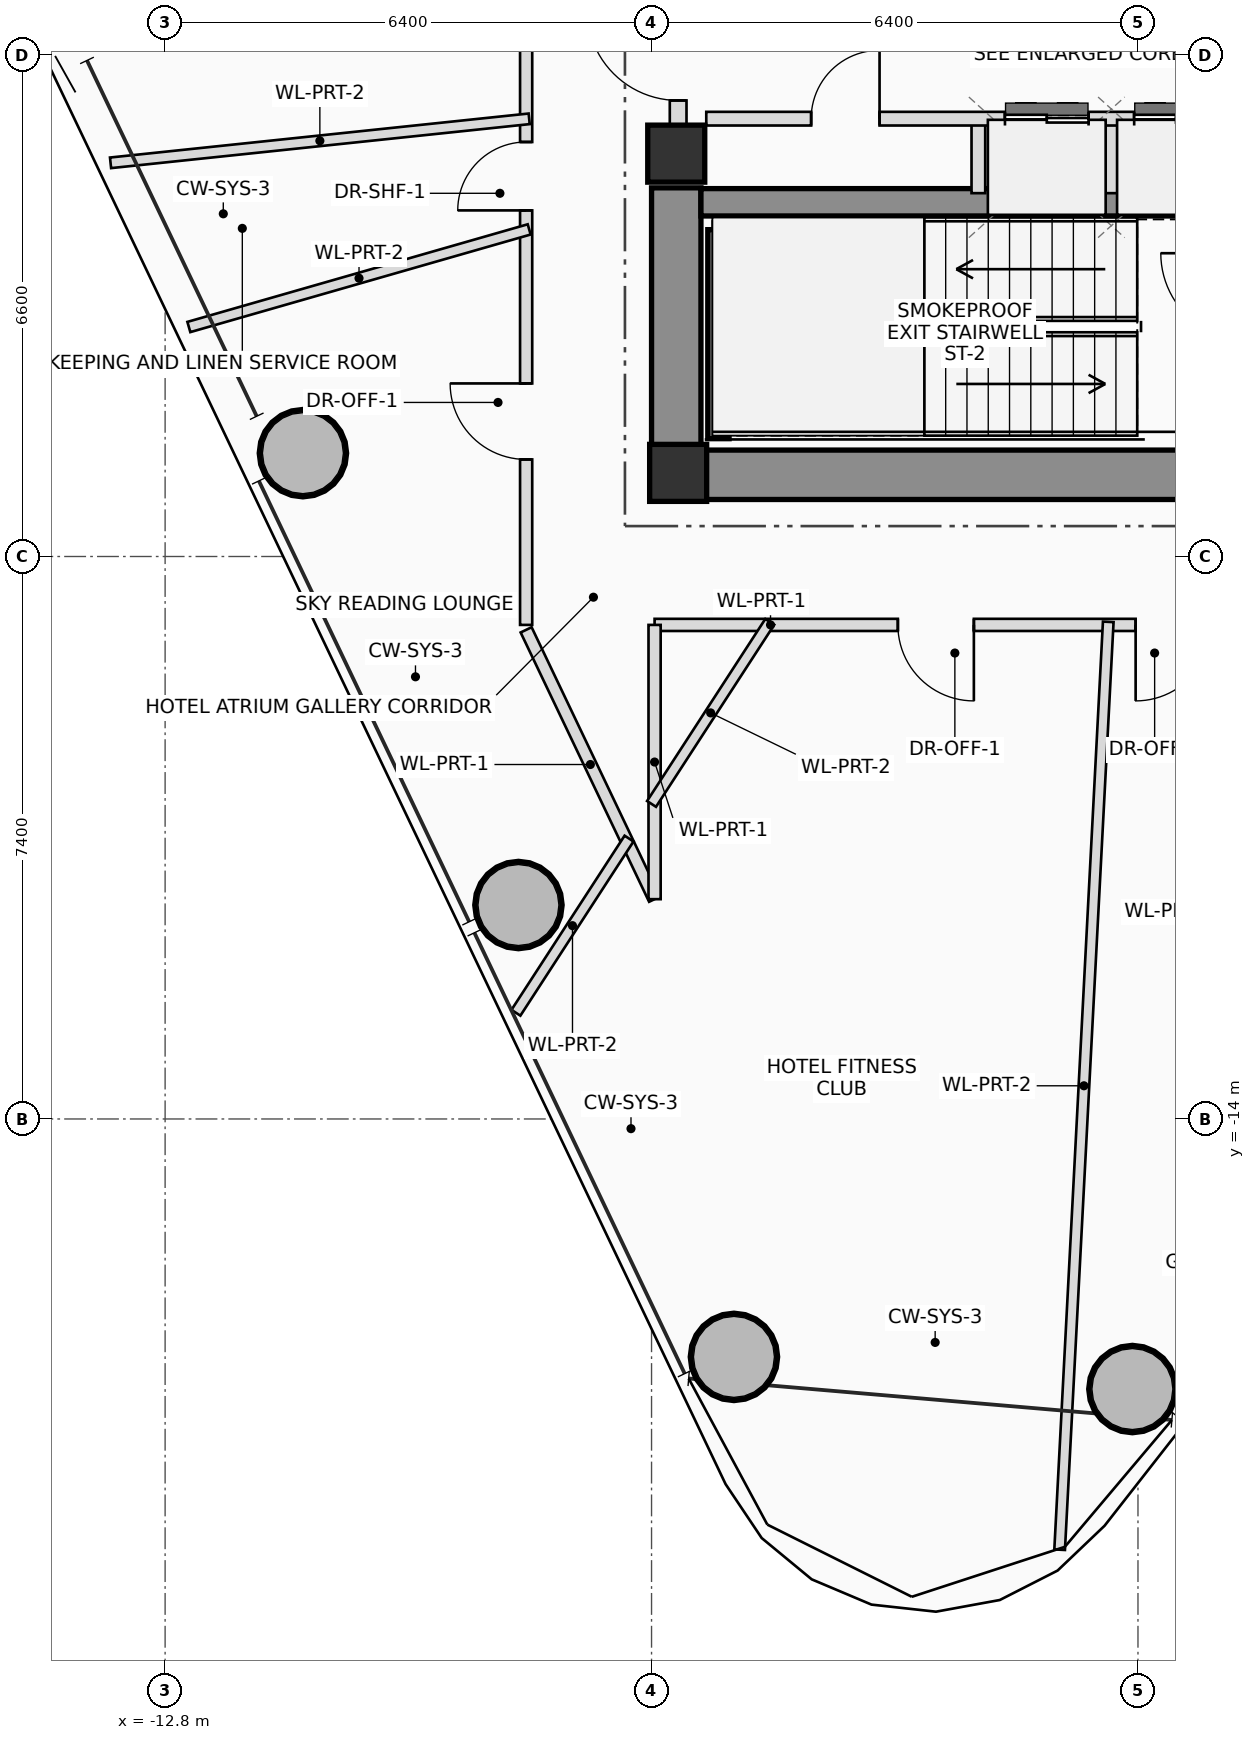
"""IFC4 building model, lengths in metres.
Left out: names, types, materials, properties, quantities, classifications, styles, units other than length and angle.
Written with IfcOpenShell. Run it as: python <this file> out.ifc"""

import sys

from ifc_helpers import new_model, si_unit, direction, frame, frame_2d, origin, origin_2d, place, context, subcontext, project, spatial, rectangle, hollow_circle, extrude, source, transform, mapped, element, fill, save


model = new_model("IFC4")
c1 = context("Model", 3, precision=1e-05, world=origin(), true_north=direction((0.0, 1.0)))
c2 = subcontext(c1, "Body", "Model", "MODEL_VIEW")
j1 = project(units=[si_unit("LENGTHUNIT", "METRE"), si_unit("PLANEANGLEUNIT", "RADIAN")], contexts=[c1])
p1 = place(None, origin())
s1 = spatial("IfcSite", under=j1, at=p1, CompositionType="ELEMENT")
p2 = place(p1, origin())
s2 = spatial("IfcBuilding", under=s1, at=p2, CompositionType="ELEMENT")
p3 = place(p2, frame((0.0, 0.0, 194.9)))
s3 = spatial("IfcBuildingStorey", under=s2, at=p3, CompositionType="ELEMENT", Elevation=194.9)
m1 = source(origin(), c2, "Body", "SweptSolid", [
    extrude(rectangle(XDim=0.75, YDim=0.75, at=origin_2d()), origin(), (0.0, 0.0, 1.0), 3.45),
])
p4 = place(p3, frame((-6.05, -5.5, 0.0), z_axis=(0.0, 0.0, 1.0), x_axis=(1.0, 0.0, 0.0)))
e1 = element("IfcColumn", 1, at=p4, inside=s3, PredefinedType="COLUMN", context=c2, shape_type="MappedRepresentation", body=[
    mapped(m1, transform((0.0, 0.0, 0.0), scale=1.0)),
])
p5 = place(p3, frame((-6.4, -5.525, 0.0), z_axis=(0.0, 0.0, 1.0), x_axis=(1.0, 0.0, 0.0)))
e2 = element("IfcWall", 2, at=p5, inside=s3, PredefinedType="SHEAR", context=c2, shape_type="SweptSolid", body=[
    extrude(rectangle(XDim=12.8, YDim=0.65, at=frame_2d((6.4, 0.0))), origin(), (0.0, 0.0, 1.0), 3.45),
])
p6 = place(p5, frame((8.6, 0.0, 0.0)))
e3 = element("IfcOpeningElement", 3, at=p6, cuts=e2, PredefinedType="OPENING", context=c2, shape_type="SweptSolid", body=[
    extrude(rectangle(XDim=1.2, YDim=2.2, at=frame_2d((0.6, 1.1))), frame((0.0, 0.335, 0.0), z_axis=(0.0, -1.0, 0.0), x_axis=(1.0, 0.0, 0.0)), (0.0, 0.0, 1.0), 0.67),
])
p7 = place(p3, frame((-6.075, -5.2, 0.0), z_axis=(0.0, 0.0, 1.0), x_axis=(0.0, 1.0, 0.0)))
e4 = element("IfcWall", 4, at=p7, inside=s3, PredefinedType="SHEAR", context=c2, shape_type="SweptSolid", body=[
    extrude(rectangle(XDim=3.45, YDim=0.65, at=frame_2d((1.725, 0.0))), origin(), (0.0, 0.0, 1.0), 3.45),
])
p8 = place(p3, frame((-5.75, -1.94, 0.0), z_axis=(0.0, 0.0, 1.0), x_axis=(1.0, 0.0, 0.0)))
e5 = element("IfcWall", 5, at=p8, inside=s3, PredefinedType="SHEAR", context=c2, shape_type="SweptSolid", body=[
    extrude(rectangle(XDim=11.5, YDim=0.36, at=frame_2d((5.75, 0.0))), origin(), (0.0, 0.0, 1.0), 3.45),
])
p9 = place(p3, frame((-5.52, -5.05, 0.0), z_axis=(0.0, 0.0, 1.0), x_axis=(0.0, 1.0, 0.0)))
e6 = element("IfcWall", 6, at=p9, inside=s3, PredefinedType="SHEAR", context=c2, shape_type="SweptSolid", body=[
    extrude(rectangle(XDim=2.75, YDim=0.28, at=frame_2d((1.375, 0.0))), origin(), (0.0, 0.0, 1.0), 3.45),
])
p10 = place(p3, frame((-6.075, -1.3, 0.0), z_axis=(0.0, 0.0, 1.0), x_axis=(1.0, 0.0, 0.0)))
e7 = element("IfcColumn", 7, at=p10, inside=s3, PredefinedType="COLUMN", context=c2, shape_type="MappedRepresentation", body=[
    mapped(m1, transform((0.0, 0.0, 0.0), scale=1.0)),
])
m2 = source(origin(), c2, "Body", "SweptSolid", [
    extrude(hollow_circle(Radius=0.575, WallThickness=0.042, at=origin_2d()), origin(), (0.0, 0.0, 1.0), 3.45),
])
for number, where, z_axis, x_axis in (
    (8, (-0.073, -17.553, 0.0), (0.0, 0.0, 1.0), (1.0, 0.0, 0.0)),
    (9, (-10.987, -5.24, 0.0), (0.0, 0.0, 1.0), (1.0, 0.0, 0.0)),
    (10, (-8.151, -11.185, 0.0), (0.0, 0.0, 1.0), (1.0, 0.0, 0.0)),
    (11, (-5.316, -17.13, 0.0), (0.0, 0.0, 1.0), (1.0, 0.0, 0.0)),
):
    element("IfcColumn", number, at=place(p3, frame(where, z_axis=z_axis, x_axis=x_axis)), inside=s3, PredefinedType="COLUMN", context=c2, shape_type="MappedRepresentation", body=[
        mapped(m2, transform((0.0, 0.0, 0.0), scale=1.0)),
    ])
p11 = place(p3, frame((-6.05, -0.95, 0.0), z_axis=(0.0, 0.0, 1.0), x_axis=(0.0, 1.0, 0.0)))
e12 = element("IfcWall", 12, at=p11, inside=s3, PredefinedType="PLUMBINGWALL", context=c2, shape_type="SweptSolid", body=[
    extrude(rectangle(XDim=1.9, YDim=0.22, at=frame_2d((0.95, 0.0))), origin(), (0.0, 0.0, 1.0), 2.23),
])
p12 = place(p11, frame((0.35, 0.0, 0.0)))
e13 = element("IfcOpeningElement", 13, at=p12, cuts=e12, PredefinedType="OPENING", context=c2, shape_type="SweptSolid", body=[
    extrude(rectangle(XDim=1.2, YDim=2.2, at=frame_2d((0.6, 1.1))), frame((0.0, 0.12, 0.0), z_axis=(0.0, -1.0, 0.0), x_axis=(1.0, 0.0, 0.0)), (0.0, 0.0, 1.0), 0.24),
])
for number, where, z_axis, x_axis in (
    (14, (-2.1, -1.82, 0.0), (0.0, 0.0, 1.0), (0.0, 1.0, 0.0)),
    (15, (-0.35, -1.82, 0.0), (0.0, 0.0, 1.0), (0.0, 1.0, 0.0)),
):
    element("IfcWall", number, at=place(p3, frame(where, z_axis=z_axis, x_axis=x_axis)), inside=s3, PredefinedType="PLUMBINGWALL", context=c2, shape_type="SweptSolid", body=[
        extrude(rectangle(XDim=0.98, YDim=0.18, at=frame_2d((0.49, 0.0))), origin(), (0.0, 0.0, 1.0), 3.25),
    ])
p13 = place(p3, frame((-5.68, -0.84, 0.0), z_axis=(0.0, 0.0, 1.0), x_axis=(1.0, 0.0, 0.0)))
e16 = element("IfcWall", 16, at=p13, inside=s3, PredefinedType="PLUMBINGWALL", context=c2, shape_type="SweptSolid", body=[
    extrude(rectangle(XDim=10.22, YDim=0.18, at=frame_2d((5.11, 0.0))), origin(), (0.0, 0.0, 1.0), 3.25),
])
p14 = place(p13, frame((1.38, 0.0, 0.0)))
e17 = element("IfcOpeningElement", 17, at=p14, cuts=e16, PredefinedType="OPENING", context=c2, shape_type="SweptSolid", body=[
    extrude(rectangle(XDim=0.9, YDim=2.05, at=frame_2d((0.45, 1.025))), frame((0.0, 0.1, 0.0), z_axis=(0.0, -1.0, 0.0), x_axis=(1.0, 0.0, 0.0)), (0.0, 0.0, 1.0), 0.2),
])
p15 = place(p13, frame((3.93, 0.0, 0.0)))
e18 = element("IfcOpeningElement", 18, at=p15, cuts=e16, PredefinedType="OPENING", context=c2, shape_type="SweptSolid", body=[
    extrude(rectangle(XDim=1.1, YDim=2.2, at=frame_2d((0.55, 1.1))), frame((0.0, 0.1, 0.0), z_axis=(0.0, -1.0, 0.0), x_axis=(1.0, 0.0, 0.0)), (0.0, 0.0, 1.0), 0.2),
])
p16 = place(p13, frame((5.63, 0.0, 0.0)))
e19 = element("IfcOpeningElement", 19, at=p16, cuts=e16, PredefinedType="OPENING", context=c2, shape_type="SweptSolid", body=[
    extrude(rectangle(XDim=1.1, YDim=2.2, at=frame_2d((0.55, 1.1))), frame((0.0, 0.1, 0.0), z_axis=(0.0, -1.0, 0.0), x_axis=(1.0, 0.0, 0.0)), (0.0, 0.0, 1.0), 0.2),
])
p17 = place(p13, frame((9.02, 0.0, 0.0)))
e20 = element("IfcOpeningElement", 20, at=p17, cuts=e16, PredefinedType="OPENING", context=c2, shape_type="SweptSolid", body=[
    extrude(rectangle(XDim=0.9, YDim=2.05, at=frame_2d((0.45, 1.025))), frame((0.0, 0.1, 0.0), z_axis=(0.0, -1.0, 0.0), x_axis=(1.0, 0.0, 0.0)), (0.0, 0.0, 1.0), 0.2),
])
p18 = place(p3, frame((-6.36, -11.108, 0.0), z_axis=(0.0, 0.0, 1.0), x_axis=(-0.430493571255, 0.902593643401, 0.0)))
e21 = element("IfcWall", 21, at=p18, inside=s3, PredefinedType="PARTITIONING", context=c2, shape_type="SweptSolid", body=[
    extrude(rectangle(XDim=3.926, YDim=0.16, at=frame_2d((1.963, 0.0))), origin(), (0.0, 0.0, 1.0), 2.605),
])
p19 = place(p3, frame((-8.05, -7.5, 0.0), z_axis=(0.0, 0.0, 1.0), x_axis=(0.0, 1.0, 0.0)))
e22 = element("IfcWall", 22, at=p19, inside=s3, PredefinedType="PARTITIONING", context=c2, shape_type="SweptSolid", body=[
    extrude(rectangle(XDim=15.0, YDim=0.16, at=frame_2d((7.5, 0.0))), origin(), (0.0, 0.0, 1.0), 2.605),
])
p20 = place(p19, frame((2.177, 0.0, 0.0)))
e23 = element("IfcOpeningElement", 23, at=p20, cuts=e22, PredefinedType="OPENING", context=c2, shape_type="SweptSolid", body=[
    extrude(rectangle(XDim=1.0, YDim=2.25, at=frame_2d((0.5, 1.125))), frame((0.0, 0.09, 0.0), z_axis=(0.0, -1.0, 0.0), x_axis=(1.0, 0.0, 0.0)), (0.0, 0.0, 1.0), 0.18),
])
p21 = place(p19, frame((5.453, 0.0, 0.0)))
e24 = element("IfcOpeningElement", 24, at=p21, cuts=e22, PredefinedType="OPENING", context=c2, shape_type="SweptSolid", body=[
    extrude(rectangle(XDim=0.9, YDim=2.05, at=frame_2d((0.45, 1.025))), frame((0.0, 0.09, 0.0), z_axis=(0.0, -1.0, 0.0), x_axis=(1.0, 0.0, 0.0)), (0.0, 0.0, 1.0), 0.18),
])
p22 = place(p19, frame((8.707, 0.0, 0.0)))
e25 = element("IfcOpeningElement", 25, at=p22, cuts=e22, PredefinedType="OPENING", context=c2, shape_type="SweptSolid", body=[
    extrude(rectangle(XDim=1.05, YDim=2.2, at=frame_2d((0.525, 1.1))), frame((0.0, 0.09, 0.0), z_axis=(0.0, -1.0, 0.0), x_axis=(1.0, 0.0, 0.0)), (0.0, 0.0, 1.0), 0.18),
])
p23 = place(p19, frame((12.397, 0.0, 0.0)))
e26 = element("IfcOpeningElement", 26, at=p23, cuts=e22, PredefinedType="OPENING", context=c2, shape_type="SweptSolid", body=[
    extrude(rectangle(XDim=1.0, YDim=2.25, at=frame_2d((0.5, 1.125))), frame((0.0, 0.09, 0.0), z_axis=(0.0, -1.0, 0.0), x_axis=(1.0, 0.0, 0.0)), (0.0, 0.0, 1.0), 0.18),
])
p24 = place(p3, frame((5.25, -7.5, 0.0), z_axis=(0.0, 0.0, 1.0), x_axis=(-1.0, 0.0, 0.0)))
e27 = element("IfcWall", 27, at=p24, inside=s3, PredefinedType="PARTITIONING", context=c2, shape_type="SweptSolid", body=[
    extrude(rectangle(XDim=11.61, YDim=0.16, at=frame_2d((5.805, 0.0))), origin(), (0.0, 0.0, 1.0), 2.605),
])
p25 = place(p24, frame((1.525, 0.0, 0.0)))
e28 = element("IfcOpeningElement", 28, at=p25, cuts=e27, PredefinedType="OPENING", context=c2, shape_type="SweptSolid", body=[
    extrude(rectangle(XDim=1.05, YDim=2.2, at=frame_2d((0.525, 1.1))), frame((0.0, 0.09, 0.0), z_axis=(0.0, -1.0, 0.0), x_axis=(1.0, 0.0, 0.0)), (0.0, 0.0, 1.0), 0.18),
])
p26 = place(p24, frame((4.281, 0.0, 0.0)))
e29 = element("IfcOpeningElement", 29, at=p26, cuts=e27, PredefinedType="OPENING", context=c2, shape_type="SweptSolid", body=[
    extrude(rectangle(XDim=1.0, YDim=2.25, at=frame_2d((0.5, 1.125))), frame((0.0, 0.09, 0.0), z_axis=(0.0, -1.0, 0.0), x_axis=(1.0, 0.0, 0.0)), (0.0, 0.0, 1.0), 0.18),
])
p27 = place(p24, frame((7.409, 0.0, 0.0)))
e30 = element("IfcOpeningElement", 30, at=p27, cuts=e27, PredefinedType="OPENING", context=c2, shape_type="SweptSolid", body=[
    extrude(rectangle(XDim=1.0, YDim=2.25, at=frame_2d((0.5, 1.125))), frame((0.0, 0.09, 0.0), z_axis=(0.0, -1.0, 0.0), x_axis=(1.0, 0.0, 0.0)), (0.0, 0.0, 1.0), 0.18),
])
p28 = place(p3, frame((-6.36, -7.5, 0.0), z_axis=(0.0, 0.0, 1.0), x_axis=(0.0, -1.0, 0.0)))
e31 = element("IfcWall", 31, at=p28, inside=s3, PredefinedType="PARTITIONING", context=c2, shape_type="SweptSolid", body=[
    extrude(rectangle(XDim=3.608, YDim=0.16, at=frame_2d((1.804, 0.0))), origin(), (0.0, 0.0, 1.0), 3.25),
])
p29 = place(p3, frame((-8.01, -0.842, 0.0), z_axis=(0.0, 0.0, 1.0), x_axis=(-0.994518006468, -0.104565457063, 0.0)))
e32 = element("IfcWall", 32, at=p29, inside=s3, PredefinedType="PARTITIONING", context=c2, shape_type="SweptSolid", body=[
    extrude(rectangle(XDim=5.538, YDim=0.14, at=frame_2d((2.769, 0.0))), origin(), (0.0, 0.0, 1.0), 2.765),
])
p30 = place(p3, frame((-8.01, -2.297, 0.0), z_axis=(0.0, 0.0, 1.0), x_axis=(-0.961260451266, -0.275641696467, 0.0)))
e33 = element("IfcWall", 33, at=p30, inside=s3, PredefinedType="PARTITIONING", context=c2, shape_type="SweptSolid", body=[
    extrude(rectangle(XDim=4.658, YDim=0.14, at=frame_2d((2.329, 0.0))), origin(), (0.0, 0.0, 1.0), 2.765),
])
p31 = place(p3, frame((-4.844, -7.46, 0.0), z_axis=(0.0, 0.0, 1.0), x_axis=(-0.544657766351, -0.838658403376, 0.0)))
e34 = element("IfcWall", 34, at=p31, inside=s3, PredefinedType="PARTITIONING", context=c2, shape_type="SweptSolid", body=[
    extrude(rectangle(XDim=2.856, YDim=0.14, at=frame_2d((1.428, 0.0))), origin(), (0.0, 0.0, 1.0), 2.605),
])
p32 = place(p3, frame((-6.696, -10.311, 0.0), z_axis=(0.0, 0.0, 1.0), x_axis=(-0.54459891399, -0.838696621479, 0.0)))
e35 = element("IfcWall", 35, at=p32, inside=s3, PredefinedType="PARTITIONING", context=c2, shape_type="SweptSolid", body=[
    extrude(rectangle(XDim=2.733, YDim=0.14, at=frame_2d((1.366, 0.0))), origin(), (0.0, 0.0, 1.0), 2.765),
])
p33 = place(p3, frame((-0.391, -7.46, 0.0), z_axis=(0.0, 0.0, 1.0), x_axis=(-0.052329252614, -0.998629886054, 0.0)))
e36 = element("IfcWall", 36, at=p33, inside=s3, PredefinedType="PARTITIONING", context=c2, shape_type="SweptSolid", body=[
    extrude(rectangle(XDim=12.224, YDim=0.14, at=frame_2d((6.112, 0.0))), origin(), (0.0, 0.0, 1.0), 2.605),
])
p34 = place(p12, origin())
e37 = element("IfcDoor", 37, at=p34, inside=s3, OperationType="SINGLE_SWING_RIGHT", PredefinedType="DOOR", context=c2, shape_type="SweptSolid", body=[
    extrude(rectangle(XDim=1.2, YDim=2.2, at=frame_2d((0.6, 1.1))), frame((0.0, 0.025, 0.0), z_axis=(0.0, -1.0, 0.0), x_axis=(1.0, 0.0, 0.0)), (0.0, 0.0, 1.0), 0.05),
])
fill(e13, e37)
p35 = place(p14, origin())
e38 = element("IfcDoor", 38, at=p35, inside=s3, OperationType="SINGLE_SWING_RIGHT", PredefinedType="DOOR", context=c2, shape_type="SweptSolid", body=[
    extrude(rectangle(XDim=0.9, YDim=2.05, at=frame_2d((0.45, 1.025))), frame((0.0, 0.025, 0.0), z_axis=(0.0, -1.0, 0.0), x_axis=(1.0, 0.0, 0.0)), (0.0, 0.0, 1.0), 0.05),
])
fill(e17, e38)
p36 = place(p15, origin())
e39 = element("IfcDoor", 39, at=p36, inside=s3, OperationType="DOUBLE_DOOR_SLIDING", PredefinedType="DOOR", context=c2, shape_type="SweptSolid", body=[
    extrude(rectangle(XDim=1.1, YDim=2.2, at=frame_2d((0.55, 1.1))), frame((0.0, 0.025, 0.0), z_axis=(0.0, -1.0, 0.0), x_axis=(1.0, 0.0, 0.0)), (0.0, 0.0, 1.0), 0.05),
])
fill(e18, e39)
p37 = place(p16, origin())
e40 = element("IfcDoor", 40, at=p37, inside=s3, OperationType="DOUBLE_DOOR_SLIDING", PredefinedType="DOOR", context=c2, shape_type="SweptSolid", body=[
    extrude(rectangle(XDim=1.1, YDim=2.2, at=frame_2d((0.55, 1.1))), frame((0.0, 0.025, 0.0), z_axis=(0.0, -1.0, 0.0), x_axis=(1.0, 0.0, 0.0)), (0.0, 0.0, 1.0), 0.05),
])
fill(e19, e40)
p38 = place(p20, origin())
e41 = element("IfcDoor", 41, at=p38, inside=s3, OperationType="SINGLE_SWING_RIGHT", PredefinedType="DOOR", context=c2, shape_type="SweptSolid", body=[
    extrude(rectangle(XDim=1.0, YDim=2.25, at=frame_2d((0.5, 1.125))), frame((0.0, 0.025, 0.0), z_axis=(0.0, -1.0, 0.0), x_axis=(1.0, 0.0, 0.0)), (0.0, 0.0, 1.0), 0.05),
])
fill(e23, e41)
p39 = place(p21, origin())
e42 = element("IfcDoor", 42, at=p39, inside=s3, OperationType="SINGLE_SWING_LEFT", PredefinedType="DOOR", context=c2, shape_type="SweptSolid", body=[
    extrude(rectangle(XDim=0.9, YDim=2.05, at=frame_2d((0.45, 1.025))), frame((0.0, 0.025, 0.0), z_axis=(0.0, -1.0, 0.0), x_axis=(1.0, 0.0, 0.0)), (0.0, 0.0, 1.0), 0.05),
])
fill(e24, e42)
p40 = place(p26, origin())
e43 = element("IfcDoor", 43, at=p40, inside=s3, OperationType="SINGLE_SWING_RIGHT", PredefinedType="DOOR", context=c2, shape_type="SweptSolid", body=[
    extrude(rectangle(XDim=1.0, YDim=2.25, at=frame_2d((0.5, 1.125))), frame((0.0, 0.025, 0.0), z_axis=(0.0, -1.0, 0.0), x_axis=(1.0, 0.0, 0.0)), (0.0, 0.0, 1.0), 0.05),
])
fill(e29, e43)
p41 = place(p27, origin())
e44 = element("IfcDoor", 44, at=p41, inside=s3, OperationType="SINGLE_SWING_LEFT", PredefinedType="DOOR", context=c2, shape_type="SweptSolid", body=[
    extrude(rectangle(XDim=1.0, YDim=2.25, at=frame_2d((0.5, 1.125))), frame((0.0, 0.025, 0.0), z_axis=(0.0, -1.0, 0.0), x_axis=(1.0, 0.0, 0.0)), (0.0, 0.0, 1.0), 0.05),
])
fill(e30, e44)
save(model, sys.argv[1])
